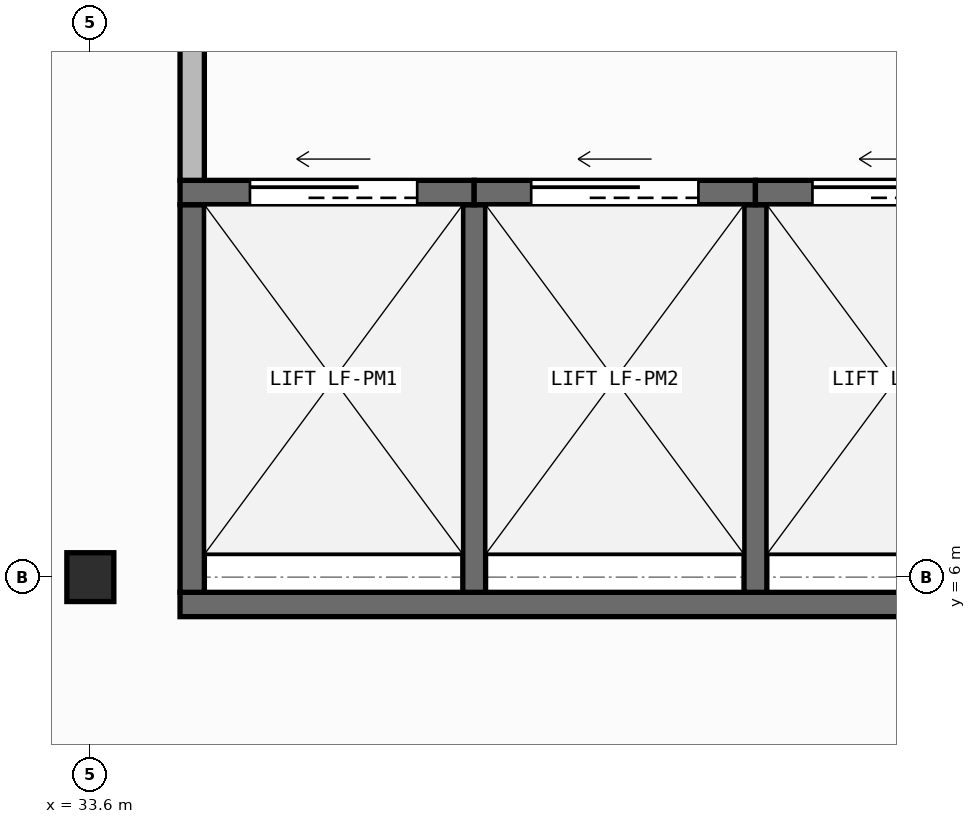
"""IFC4 building model, lengths in metres.
Left out: names, types, materials, properties, quantities, classifications, styles, units other than length and angle.
Written with IfcOpenShell. Run it as: python <this file> out.ifc"""

import sys

from ifc_helpers import new_model, si_unit, direction, frame, frame_2d, origin, origin_2d, place, context, subcontext, project, spatial, rectangle, i_section, extrude, element, fill, save


model = new_model("IFC4")
c1 = context("Model", 3, precision=1e-05, world=origin(), true_north=direction((0.0, 1.0)))
c2 = subcontext(c1, "Body", "Model", "MODEL_VIEW")
j1 = project(units=[si_unit("LENGTHUNIT", "METRE"), si_unit("PLANEANGLEUNIT", "RADIAN")], contexts=[c1])
p1 = place(None, origin())
s1 = spatial("IfcSite", under=j1, at=p1, CompositionType="ELEMENT")
p2 = place(p1, origin())
s2 = spatial("IfcBuilding", under=s1, at=p2, CompositionType="ELEMENT")
p3 = place(p2, frame((0.0, 0.0, 107.3)))
s3 = spatial("IfcBuildingStorey", under=s2, at=p3, CompositionType="ELEMENT", Elevation=107.3)
p4 = place(p3, frame((33.6, 6.0, 0.0), z_axis=(0.0, 0.0, 1.0), x_axis=(1.0, 0.0, 0.0)))
e1 = element("IfcColumn", 1, at=p4, inside=s3, PredefinedType="COLUMN", context=c2, shape_type="SweptSolid", body=[
    extrude(i_section(OverallWidth=0.309, OverallDepth=0.321, WebThickness=0.014, FlangeThickness=0.022, FilletRadius=0.017, at=origin_2d()), origin(), (0.0, 0.0, 1.0), 3.95),
])
p5 = place(p3, frame((34.19, 5.82, 0.0), z_axis=(0.0, 0.0, 1.0), x_axis=(1.0, 0.0, 0.0)))
e2 = element("IfcWall", 2, at=p5, inside=s3, PredefinedType="SHEAR", context=c2, shape_type="SweptSolid", body=[
    extrude(rectangle(XDim=5.72, YDim=0.16, at=frame_2d((2.86, 0.0))), origin(), (0.0, 0.0, 1.0), 3.71),
])
p6 = place(p3, frame((34.27, 5.9, 0.0), z_axis=(0.0, 0.0, 1.0), x_axis=(0.0, 1.0, 0.0)))
e3 = element("IfcWall", 3, at=p6, inside=s3, PredefinedType="SHEAR", context=c2, shape_type="SweptSolid", body=[
    extrude(rectangle(XDim=2.55, YDim=0.16, at=frame_2d((1.275, 0.0))), origin(), (0.0, 0.0, 1.0), 3.71),
])
for number, where, z_axis, x_axis in (
    (4, (36.125, 5.9, 0.0), (0.0, 0.0, 1.0), (0.0, 1.0, 0.0)),
    (5, (37.975, 5.9, 0.0), (0.0, 0.0, 1.0), (0.0, 1.0, 0.0)),
):
    element("IfcWall", number, at=place(p3, frame(where, z_axis=z_axis, x_axis=x_axis)), inside=s3, PredefinedType="SHEAR", context=c2, shape_type="SweptSolid", body=[
        extrude(rectangle(XDim=2.55, YDim=0.15, at=frame_2d((1.275, 0.0))), origin(), (0.0, 0.0, 1.0), 3.71),
    ])
p7 = place(p3, frame((34.19, 8.53, 0.0), z_axis=(0.0, 0.0, 1.0), x_axis=(1.0, 0.0, 0.0)))
e6 = element("IfcWall", 6, at=p7, inside=s3, PredefinedType="SHEAR", context=c2, shape_type="SweptSolid", body=[
    extrude(rectangle(XDim=1.935, YDim=0.16, at=frame_2d((0.968, 0.0))), origin(), (0.0, 0.0, 1.0), 3.71),
])
p8 = place(p7, frame((0.46, 0.0, 0.0)))
e7 = element("IfcOpeningElement", 7, at=p8, cuts=e6, PredefinedType="OPENING", context=c2, shape_type="SweptSolid", body=[
    extrude(rectangle(XDim=1.1, YDim=2.15, at=frame_2d((0.55, 1.075))), frame((0.0, 0.09, 0.0), z_axis=(0.0, -1.0, 0.0), x_axis=(1.0, 0.0, 0.0)), (0.0, 0.0, 1.0), 0.18),
])
p9 = place(p3, frame((36.125, 8.53, 0.0), z_axis=(0.0, 0.0, 1.0), x_axis=(1.0, 0.0, 0.0)))
e8 = element("IfcWall", 8, at=p9, inside=s3, PredefinedType="SHEAR", context=c2, shape_type="SweptSolid", body=[
    extrude(rectangle(XDim=1.85, YDim=0.16, at=frame_2d((0.925, 0.0))), origin(), (0.0, 0.0, 1.0), 3.71),
])
p10 = place(p9, frame((0.375, 0.0, 0.0)))
e9 = element("IfcOpeningElement", 9, at=p10, cuts=e8, PredefinedType="OPENING", context=c2, shape_type="SweptSolid", body=[
    extrude(rectangle(XDim=1.1, YDim=2.15, at=frame_2d((0.55, 1.075))), frame((0.0, 0.09, 0.0), z_axis=(0.0, -1.0, 0.0), x_axis=(1.0, 0.0, 0.0)), (0.0, 0.0, 1.0), 0.18),
])
p11 = place(p3, frame((37.975, 8.53, 0.0), z_axis=(0.0, 0.0, 1.0), x_axis=(1.0, 0.0, 0.0)))
e10 = element("IfcWall", 10, at=p11, inside=s3, PredefinedType="SHEAR", context=c2, shape_type="SweptSolid", body=[
    extrude(rectangle(XDim=1.935, YDim=0.16, at=frame_2d((0.967, 0.0))), origin(), (0.0, 0.0, 1.0), 3.71),
])
p12 = place(p11, frame((0.375, 0.0, 0.0)))
e11 = element("IfcOpeningElement", 11, at=p12, cuts=e10, PredefinedType="OPENING", context=c2, shape_type="SweptSolid", body=[
    extrude(rectangle(XDim=1.1, YDim=2.15, at=frame_2d((0.55, 1.075))), frame((0.0, 0.09, 0.0), z_axis=(0.0, -1.0, 0.0), x_axis=(1.0, 0.0, 0.0)), (0.0, 0.0, 1.0), 0.18),
])
p13 = place(p3, frame((34.27, 8.61, 0.0), z_axis=(0.0, 0.0, 1.0), x_axis=(0.0, 1.0, 0.0)))
e12 = element("IfcWall", 12, at=p13, inside=s3, PredefinedType="PARTITIONING", context=c2, shape_type="SweptSolid", body=[
    extrude(rectangle(XDim=3.39, YDim=0.16, at=frame_2d((1.695, 0.0))), origin(), (0.0, 0.0, 1.0), 3.71),
])
p14 = place(p8, origin())
e13 = element("IfcDoor", 13, at=p14, inside=s3, OperationType="SLIDING_TO_LEFT", PredefinedType="DOOR", context=c2, shape_type="SweptSolid", body=[
    extrude(rectangle(XDim=1.1, YDim=2.15, at=frame_2d((0.55, 1.075))), frame((0.0, 0.025, 0.0), z_axis=(0.0, -1.0, 0.0), x_axis=(1.0, 0.0, 0.0)), (0.0, 0.0, 1.0), 0.05),
])
fill(e7, e13)
p15 = place(p10, origin())
e14 = element("IfcDoor", 14, at=p15, inside=s3, OperationType="SLIDING_TO_LEFT", PredefinedType="DOOR", context=c2, shape_type="SweptSolid", body=[
    extrude(rectangle(XDim=1.1, YDim=2.15, at=frame_2d((0.55, 1.075))), frame((0.0, 0.025, 0.0), z_axis=(0.0, -1.0, 0.0), x_axis=(1.0, 0.0, 0.0)), (0.0, 0.0, 1.0), 0.05),
])
fill(e9, e14)
p16 = place(p12, origin())
e15 = element("IfcDoor", 15, at=p16, inside=s3, OperationType="SLIDING_TO_LEFT", PredefinedType="DOOR", context=c2, shape_type="SweptSolid", body=[
    extrude(rectangle(XDim=1.1, YDim=2.15, at=frame_2d((0.55, 1.075))), frame((0.0, 0.025, 0.0), z_axis=(0.0, -1.0, 0.0), x_axis=(1.0, 0.0, 0.0)), (0.0, 0.0, 1.0), 0.05),
])
fill(e11, e15)
save(model, sys.argv[1])
